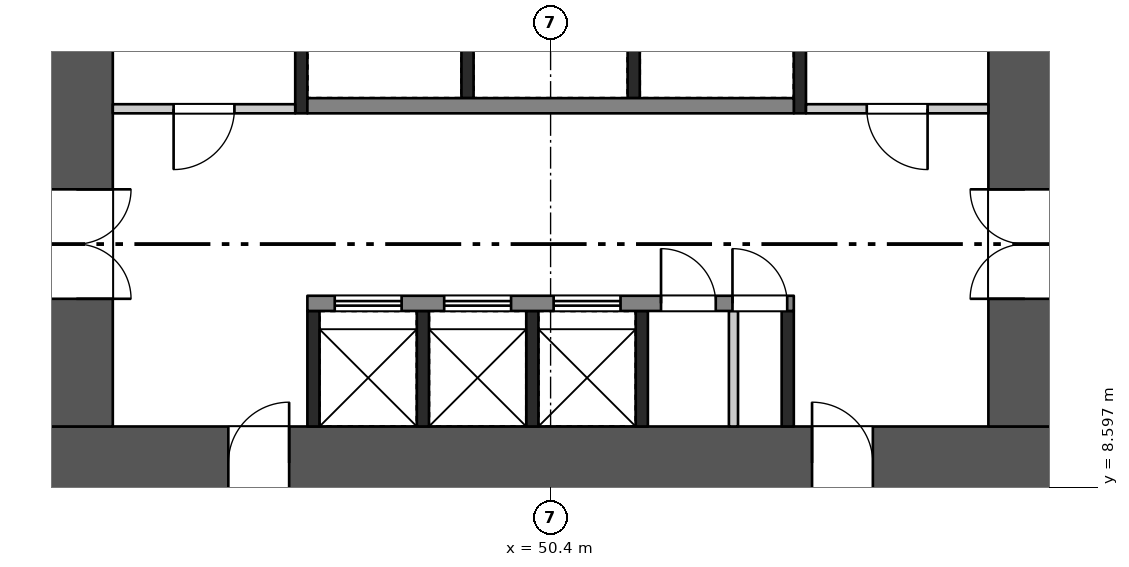
"""IFC4 building model, lengths in metres.
Left out: names, types, materials, properties, quantities, classifications, styles, units other than length and angle.
Written with IfcOpenShell. Run it as: python <this file> out.ifc"""

import sys

from ifc_helpers import new_model, si_unit, direction, frame, frame_2d, origin, place, context, subcontext, project, spatial, rectangle, extrude, element, fill, save


model = new_model("IFC4")
c1 = context("Model", 3, precision=1e-05, world=origin(), true_north=direction((0.0, 1.0)))
c2 = subcontext(c1, "Body", "Model", "MODEL_VIEW")
j1 = project(units=[si_unit("LENGTHUNIT", "METRE"), si_unit("PLANEANGLEUNIT", "RADIAN")], contexts=[c1])
p1 = place(None, origin())
s1 = spatial("IfcSite", under=j1, at=p1, CompositionType="ELEMENT")
p2 = place(p1, origin())
s2 = spatial("IfcBuilding", under=s1, at=p2, CompositionType="ELEMENT")
p3 = place(p2, frame((0.0, 0.0, 56.7)))
s3 = spatial("IfcBuildingStorey", under=s2, at=p3, CompositionType="ELEMENT", Elevation=56.7)
p4 = place(p3, frame((42.0, 9.0, 0.0), z_axis=(0.0, 0.0, 1.0), x_axis=(1.0, 0.0, 0.0)))
e1 = element("IfcWall", 1, at=p4, inside=s3, PredefinedType="SHEAR", context=c2, shape_type="SweptSolid", body=[
    extrude(rectangle(XDim=16.8, YDim=1.2, at=frame_2d((8.4, 0.0))), origin(), (0.0, 0.0, 1.0), 3.22),
])
p5 = place(p4, frame((3.1, 0.0, 0.0)))
e2 = element("IfcOpeningElement", 2, at=p5, cuts=e1, PredefinedType="OPENING", context=c2, shape_type="SweptSolid", body=[
    extrude(rectangle(XDim=1.0, YDim=2.1, at=frame_2d((0.5, 1.05))), frame((0.0, 0.61, 0.0), z_axis=(0.0, -1.0, 0.0), x_axis=(1.0, 0.0, 0.0)), (0.0, 0.0, 1.0), 1.22),
])
p6 = place(p4, frame((12.7, 0.0, 0.0)))
e3 = element("IfcOpeningElement", 3, at=p6, cuts=e1, PredefinedType="OPENING", context=c2, shape_type="SweptSolid", body=[
    extrude(rectangle(XDim=1.0, YDim=2.1, at=frame_2d((0.5, 1.05))), frame((0.0, 0.61, 0.0), z_axis=(0.0, -1.0, 0.0), x_axis=(1.0, 0.0, 0.0)), (0.0, 0.0, 1.0), 1.22),
])
p7 = place(p3, frame((42.6, 9.6, 0.0), z_axis=(0.0, 0.0, 1.0), x_axis=(0.0, 1.0, 0.0)))
e4 = element("IfcWall", 4, at=p7, inside=s3, PredefinedType="SHEAR", context=c2, shape_type="SweptSolid", body=[
    extrude(rectangle(XDim=14.4, YDim=1.2, at=frame_2d((7.2, 0.0))), origin(), (0.0, 0.0, 1.0), 3.22),
])
p8 = place(p7, frame((2.1, 0.0, 0.0)))
e5 = element("IfcOpeningElement", 5, at=p8, cuts=e4, PredefinedType="OPENING", context=c2, shape_type="SweptSolid", body=[
    extrude(rectangle(XDim=1.8, YDim=2.1, at=frame_2d((0.9, 1.05))), frame((0.0, 0.61, 0.0), z_axis=(0.0, -1.0, 0.0), x_axis=(1.0, 0.0, 0.0)), (0.0, 0.0, 1.0), 1.22),
])
p9 = place(p3, frame((58.2, 9.6, 0.0), z_axis=(0.0, 0.0, 1.0), x_axis=(0.0, 1.0, 0.0)))
e6 = element("IfcWall", 6, at=p9, inside=s3, PredefinedType="SHEAR", context=c2, shape_type="SweptSolid", body=[
    extrude(rectangle(XDim=14.4, YDim=1.2, at=frame_2d((7.2, 0.0))), origin(), (0.0, 0.0, 1.0), 3.22),
])
p10 = place(p9, frame((2.1, 0.0, 0.0)))
e7 = element("IfcOpeningElement", 7, at=p10, cuts=e6, PredefinedType="OPENING", context=c2, shape_type="SweptSolid", body=[
    extrude(rectangle(XDim=1.8, YDim=2.1, at=frame_2d((0.9, 1.05))), frame((0.0, 0.61, 0.0), z_axis=(0.0, -1.0, 0.0), x_axis=(1.0, 0.0, 0.0)), (0.0, 0.0, 1.0), 1.22),
])
for number, where, z_axis, x_axis in (
    (8, (46.5, 9.6, 0.0), (0.0, 0.0, 1.0), (0.0, 1.0, 0.0)),
    (9, (48.3, 9.6, 0.0), (0.0, 0.0, 1.0), (0.0, 1.0, 0.0)),
    (10, (50.1, 9.6, 0.0), (0.0, 0.0, 1.0), (0.0, 1.0, 0.0)),
    (11, (51.9, 9.6, 0.0), (0.0, 0.0, 1.0), (0.0, 1.0, 0.0)),
    (12, (54.3, 9.6, 0.0), (0.0, 0.0, 1.0), (0.0, 1.0, 0.0)),
):
    element("IfcWall", number, at=place(p3, frame(where, z_axis=z_axis, x_axis=x_axis)), inside=s3, PredefinedType="SHEAR", context=c2, shape_type="SweptSolid", body=[
        extrude(rectangle(XDim=1.9, YDim=0.2, at=frame_2d((0.95, 0.0))), origin(), (0.0, 0.0, 1.0), 3.22),
    ])
p11 = place(p3, frame((53.407, 9.6, 0.0), z_axis=(0.0, 0.0, 1.0), x_axis=(0.0, 1.0, 0.0)))
e13 = element("IfcWall", 13, at=p11, inside=s3, PredefinedType="PARTITIONING", context=c2, shape_type="SweptSolid", body=[
    extrude(rectangle(XDim=1.9, YDim=0.15, at=frame_2d((0.95, 0.0))), origin(), (0.0, 0.0, 1.0), 3.22),
])
p12 = place(p3, frame((46.4, 11.625, 0.0), z_axis=(0.0, 0.0, 1.0), x_axis=(1.0, 0.0, 0.0)))
e14 = element("IfcWall", 14, at=p12, inside=s3, PredefinedType="SHEAR", context=c2, shape_type="SweptSolid", body=[
    extrude(rectangle(XDim=8.0, YDim=0.25, at=frame_2d((4.0, 0.0))), origin(), (0.0, 0.0, 1.0), 3.22),
])
p13 = place(p12, frame((0.45, 0.0, 0.0)))
e15 = element("IfcOpeningElement", 15, at=p13, cuts=e14, PredefinedType="OPENING", context=c2, shape_type="SweptSolid", body=[
    extrude(rectangle(XDim=1.1, YDim=2.1, at=frame_2d((0.55, 1.05))), frame((0.0, 0.135, 0.0), z_axis=(0.0, -1.0, 0.0), x_axis=(1.0, 0.0, 0.0)), (0.0, 0.0, 1.0), 0.27),
])
p14 = place(p12, frame((2.25, 0.0, 0.0)))
e16 = element("IfcOpeningElement", 16, at=p14, cuts=e14, PredefinedType="OPENING", context=c2, shape_type="SweptSolid", body=[
    extrude(rectangle(XDim=1.1, YDim=2.1, at=frame_2d((0.55, 1.05))), frame((0.0, 0.135, 0.0), z_axis=(0.0, -1.0, 0.0), x_axis=(1.0, 0.0, 0.0)), (0.0, 0.0, 1.0), 0.27),
])
p15 = place(p12, frame((4.05, 0.0, 0.0)))
e17 = element("IfcOpeningElement", 17, at=p15, cuts=e14, PredefinedType="OPENING", context=c2, shape_type="SweptSolid", body=[
    extrude(rectangle(XDim=1.1, YDim=2.1, at=frame_2d((0.55, 1.05))), frame((0.0, 0.135, 0.0), z_axis=(0.0, -1.0, 0.0), x_axis=(1.0, 0.0, 0.0)), (0.0, 0.0, 1.0), 0.27),
])
p16 = place(p12, frame((5.816, 0.0, 0.0)))
e18 = element("IfcOpeningElement", 18, at=p16, cuts=e14, PredefinedType="OPENING", context=c2, shape_type="SweptSolid", body=[
    extrude(rectangle(XDim=0.9, YDim=2.1, at=frame_2d((0.45, 1.05))), frame((0.0, 0.135, 0.0), z_axis=(0.0, -1.0, 0.0), x_axis=(1.0, 0.0, 0.0)), (0.0, 0.0, 1.0), 0.27),
])
p17 = place(p12, frame((6.991, 0.0, 0.0)))
e19 = element("IfcOpeningElement", 19, at=p17, cuts=e14, PredefinedType="OPENING", context=c2, shape_type="SweptSolid", body=[
    extrude(rectangle(XDim=0.9, YDim=2.1, at=frame_2d((0.45, 1.05))), frame((0.0, 0.135, 0.0), z_axis=(0.0, -1.0, 0.0), x_axis=(1.0, 0.0, 0.0)), (0.0, 0.0, 1.0), 0.27),
])
for number, where, z_axis, x_axis in (
    (20, (49.033, 15.0, 0.0), (0.0, 0.0, 1.0), (0.0, 1.0, 0.0)),
    (21, (51.767, 15.0, 0.0), (0.0, 0.0, 1.0), (0.0, 1.0, 0.0)),
):
    element("IfcWall", number, at=place(p3, frame(where, z_axis=z_axis, x_axis=x_axis)), inside=s3, PredefinedType="SHEAR", context=c2, shape_type="SweptSolid", body=[
        extrude(rectangle(XDim=1.9, YDim=0.2, at=frame_2d((0.95, 0.0))), origin(), (0.0, 0.0, 1.0), 3.22),
    ])
p18 = place(p3, frame((46.4, 14.875, 0.0), z_axis=(0.0, 0.0, 1.0), x_axis=(1.0, 0.0, 0.0)))
e22 = element("IfcWall", 22, at=p18, inside=s3, PredefinedType="SHEAR", context=c2, shape_type="SweptSolid", body=[
    extrude(rectangle(XDim=8.0, YDim=0.25, at=frame_2d((4.0, 0.0))), origin(), (0.0, 0.0, 1.0), 3.22),
])
p19 = place(p3, frame((46.3, 14.75, 0.0), z_axis=(0.0, 0.0, 1.0), x_axis=(0.0, 1.0, 0.0)))
e23 = element("IfcWall", 23, at=p19, inside=s3, PredefinedType="SHEAR", context=c2, shape_type="SweptSolid", body=[
    extrude(rectangle(XDim=2.4, YDim=0.2, at=frame_2d((1.2, 0.0))), origin(), (0.0, 0.0, 1.0), 3.22),
])
p20 = place(p3, frame((43.2, 14.825, 0.0), z_axis=(0.0, 0.0, 1.0), x_axis=(1.0, 0.0, 0.0)))
e24 = element("IfcWall", 24, at=p20, inside=s3, PredefinedType="PARTITIONING", context=c2, shape_type="SweptSolid", body=[
    extrude(rectangle(XDim=3.0, YDim=0.15, at=frame_2d((1.5, 0.0))), origin(), (0.0, 0.0, 1.0), 3.22),
])
p21 = place(p20, frame((1.0, 0.0, 0.0)))
e25 = element("IfcOpeningElement", 25, at=p21, cuts=e24, PredefinedType="OPENING", context=c2, shape_type="SweptSolid", body=[
    extrude(rectangle(XDim=1.0, YDim=2.1, at=frame_2d((0.5, 1.05))), frame((0.0, 0.085, 0.0), z_axis=(0.0, -1.0, 0.0), x_axis=(1.0, 0.0, 0.0)), (0.0, 0.0, 1.0), 0.17),
])
p22 = place(p3, frame((54.5, 14.75, 0.0), z_axis=(0.0, 0.0, 1.0), x_axis=(0.0, 1.0, 0.0)))
e26 = element("IfcWall", 26, at=p22, inside=s3, PredefinedType="SHEAR", context=c2, shape_type="SweptSolid", body=[
    extrude(rectangle(XDim=2.4, YDim=0.2, at=frame_2d((1.2, 0.0))), origin(), (0.0, 0.0, 1.0), 3.22),
])
p23 = place(p3, frame((54.6, 14.825, 0.0), z_axis=(0.0, 0.0, 1.0), x_axis=(1.0, 0.0, 0.0)))
e27 = element("IfcWall", 27, at=p23, inside=s3, PredefinedType="PARTITIONING", context=c2, shape_type="SweptSolid", body=[
    extrude(rectangle(XDim=3.0, YDim=0.15, at=frame_2d((1.5, 0.0))), origin(), (0.0, 0.0, 1.0), 3.22),
])
p24 = place(p23, frame((1.0, 0.0, 0.0)))
e28 = element("IfcOpeningElement", 28, at=p24, cuts=e27, PredefinedType="OPENING", context=c2, shape_type="SweptSolid", body=[
    extrude(rectangle(XDim=1.0, YDim=2.1, at=frame_2d((0.5, 1.05))), frame((0.0, 0.085, 0.0), z_axis=(0.0, -1.0, 0.0), x_axis=(1.0, 0.0, 0.0)), (0.0, 0.0, 1.0), 0.17),
])
p25 = place(p5, origin())
e29 = element("IfcDoor", 29, at=p25, inside=s3, OperationType="SINGLE_SWING_RIGHT", PredefinedType="DOOR", context=c2, shape_type="SweptSolid", body=[
    extrude(rectangle(XDim=1.0, YDim=2.1, at=frame_2d((0.5, 1.05))), frame((0.0, 0.025, 0.0), z_axis=(0.0, -1.0, 0.0), x_axis=(1.0, 0.0, 0.0)), (0.0, 0.0, 1.0), 0.05),
])
fill(e2, e29)
p26 = place(p6, origin())
e30 = element("IfcDoor", 30, at=p26, inside=s3, OperationType="SINGLE_SWING_LEFT", PredefinedType="DOOR", context=c2, shape_type="SweptSolid", body=[
    extrude(rectangle(XDim=1.0, YDim=2.1, at=frame_2d((0.5, 1.05))), frame((0.0, 0.025, 0.0), z_axis=(0.0, -1.0, 0.0), x_axis=(1.0, 0.0, 0.0)), (0.0, 0.0, 1.0), 0.05),
])
fill(e3, e30)
p27 = place(p8, frame((1.8, 0.0, 0.0), z_axis=(0.0, 0.0, 1.0), x_axis=(-1.0, 0.0, 0.0)))
e31 = element("IfcDoor", 31, at=p27, inside=s3, OperationType="DOUBLE_DOOR_SINGLE_SWING", PredefinedType="DOOR", context=c2, shape_type="SweptSolid", body=[
    extrude(rectangle(XDim=1.8, YDim=2.1, at=frame_2d((0.9, 1.05))), frame((0.0, 0.025, 0.0), z_axis=(0.0, -1.0, 0.0), x_axis=(1.0, 0.0, 0.0)), (0.0, 0.0, 1.0), 0.05),
])
fill(e5, e31)
p28 = place(p10, origin())
e32 = element("IfcDoor", 32, at=p28, inside=s3, OperationType="DOUBLE_DOOR_SINGLE_SWING", PredefinedType="DOOR", context=c2, shape_type="SweptSolid", body=[
    extrude(rectangle(XDim=1.8, YDim=2.1, at=frame_2d((0.9, 1.05))), frame((0.0, 0.025, 0.0), z_axis=(0.0, -1.0, 0.0), x_axis=(1.0, 0.0, 0.0)), (0.0, 0.0, 1.0), 0.05),
])
fill(e7, e32)
p29 = place(p13, origin())
e33 = element("IfcDoor", 33, at=p29, inside=s3, OperationType="DOUBLE_DOOR_SLIDING", PredefinedType="DOOR", context=c2, shape_type="SweptSolid", body=[
    extrude(rectangle(XDim=1.1, YDim=2.1, at=frame_2d((0.55, 1.05))), frame((0.0, 0.025, 0.0), z_axis=(0.0, -1.0, 0.0), x_axis=(1.0, 0.0, 0.0)), (0.0, 0.0, 1.0), 0.05),
])
fill(e15, e33)
p30 = place(p14, origin())
e34 = element("IfcDoor", 34, at=p30, inside=s3, OperationType="DOUBLE_DOOR_SLIDING", PredefinedType="DOOR", context=c2, shape_type="SweptSolid", body=[
    extrude(rectangle(XDim=1.1, YDim=2.1, at=frame_2d((0.55, 1.05))), frame((0.0, 0.025, 0.0), z_axis=(0.0, -1.0, 0.0), x_axis=(1.0, 0.0, 0.0)), (0.0, 0.0, 1.0), 0.05),
])
fill(e16, e34)
p31 = place(p15, origin())
e35 = element("IfcDoor", 35, at=p31, inside=s3, OperationType="DOUBLE_DOOR_SLIDING", PredefinedType="DOOR", context=c2, shape_type="SweptSolid", body=[
    extrude(rectangle(XDim=1.1, YDim=2.1, at=frame_2d((0.55, 1.05))), frame((0.0, 0.025, 0.0), z_axis=(0.0, -1.0, 0.0), x_axis=(1.0, 0.0, 0.0)), (0.0, 0.0, 1.0), 0.05),
])
fill(e17, e35)
p32 = place(p16, origin())
e36 = element("IfcDoor", 36, at=p32, inside=s3, OperationType="SINGLE_SWING_LEFT", PredefinedType="DOOR", context=c2, shape_type="SweptSolid", body=[
    extrude(rectangle(XDim=0.9, YDim=2.1, at=frame_2d((0.45, 1.05))), frame((0.0, 0.025, 0.0), z_axis=(0.0, -1.0, 0.0), x_axis=(1.0, 0.0, 0.0)), (0.0, 0.0, 1.0), 0.05),
])
fill(e18, e36)
p33 = place(p17, origin())
e37 = element("IfcDoor", 37, at=p33, inside=s3, OperationType="SINGLE_SWING_LEFT", PredefinedType="DOOR", context=c2, shape_type="SweptSolid", body=[
    extrude(rectangle(XDim=0.9, YDim=2.1, at=frame_2d((0.45, 1.05))), frame((0.0, 0.025, 0.0), z_axis=(0.0, -1.0, 0.0), x_axis=(1.0, 0.0, 0.0)), (0.0, 0.0, 1.0), 0.05),
])
fill(e19, e37)
p34 = place(p21, frame((1.0, 0.0, 0.0), z_axis=(0.0, 0.0, 1.0), x_axis=(-1.0, 0.0, 0.0)))
e38 = element("IfcDoor", 38, at=p34, inside=s3, OperationType="SINGLE_SWING_RIGHT", PredefinedType="DOOR", context=c2, shape_type="SweptSolid", body=[
    extrude(rectangle(XDim=1.0, YDim=2.1, at=frame_2d((0.5, 1.05))), frame((0.0, 0.025, 0.0), z_axis=(0.0, -1.0, 0.0), x_axis=(1.0, 0.0, 0.0)), (0.0, 0.0, 1.0), 0.05),
])
fill(e25, e38)
p35 = place(p24, frame((1.0, 0.0, 0.0), z_axis=(0.0, 0.0, 1.0), x_axis=(-1.0, 0.0, 0.0)))
e39 = element("IfcDoor", 39, at=p35, inside=s3, OperationType="SINGLE_SWING_LEFT", PredefinedType="DOOR", context=c2, shape_type="SweptSolid", body=[
    extrude(rectangle(XDim=1.0, YDim=2.1, at=frame_2d((0.5, 1.05))), frame((0.0, 0.025, 0.0), z_axis=(0.0, -1.0, 0.0), x_axis=(1.0, 0.0, 0.0)), (0.0, 0.0, 1.0), 0.05),
])
fill(e28, e39)
save(model, sys.argv[1])
